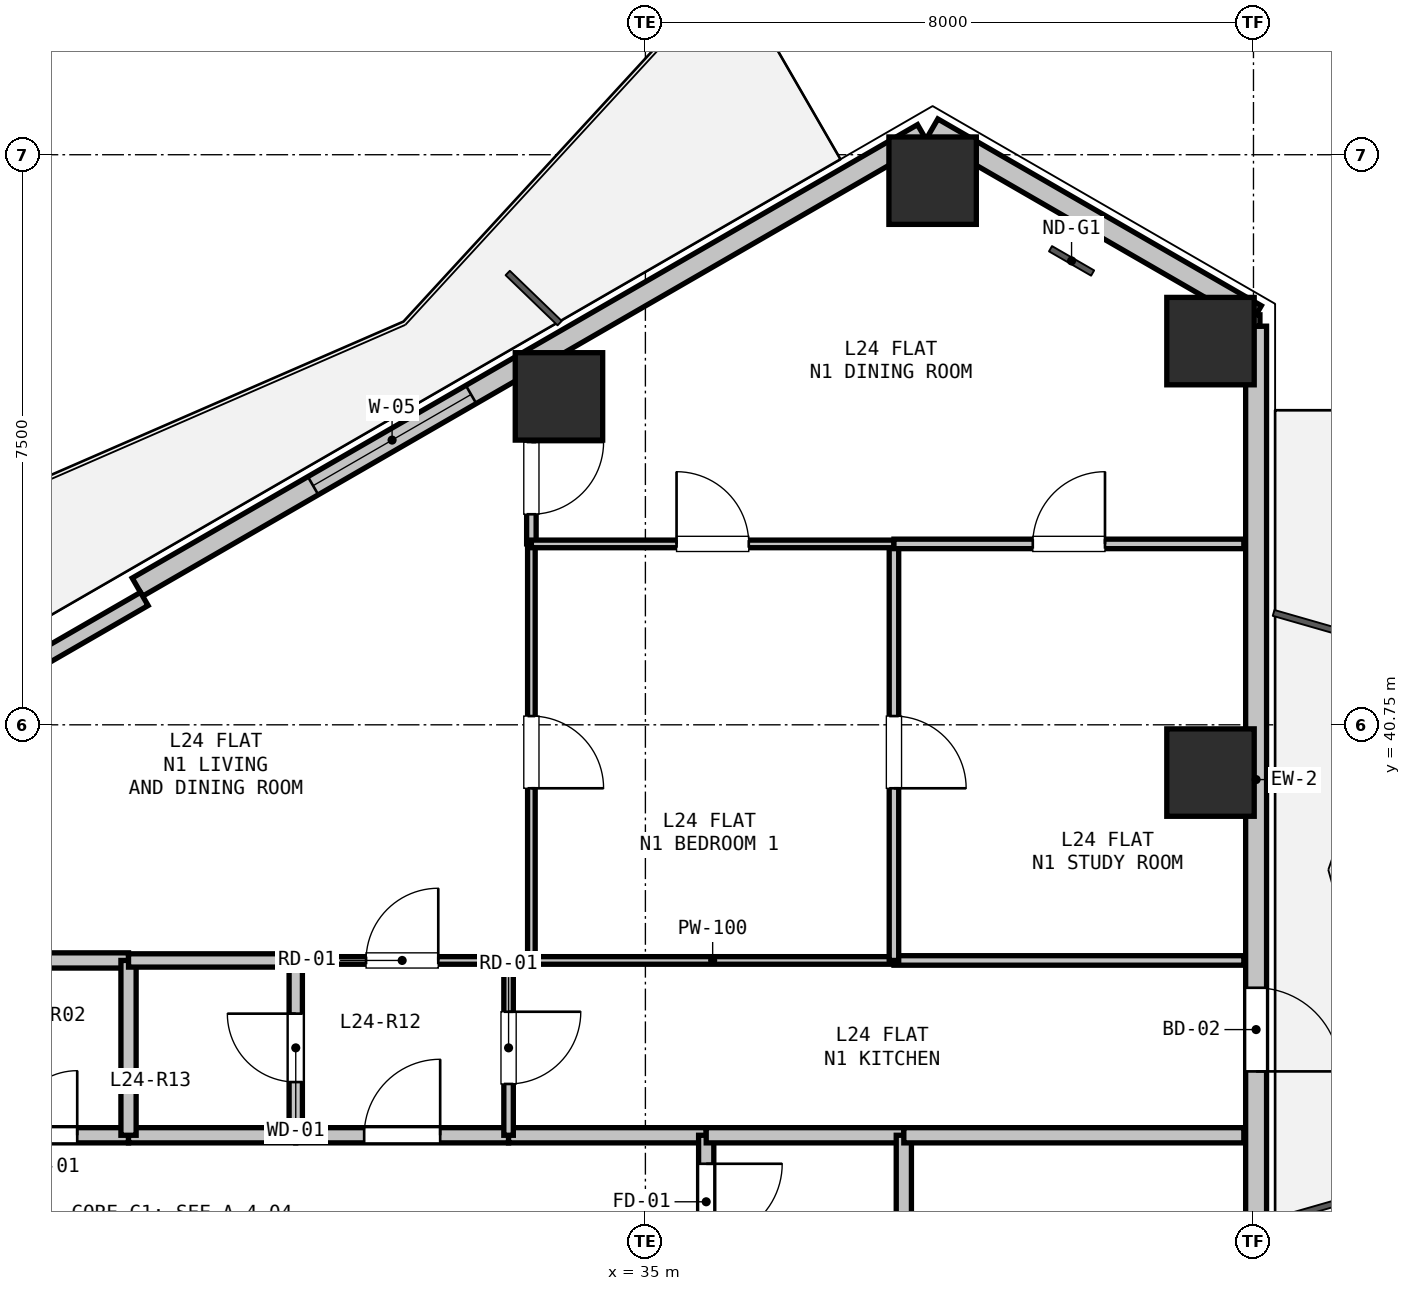
"""IFC4 building model, lengths in metres.
Left out: names, types, materials, properties, quantities, classifications, styles, units other than length and angle.
Written with IfcOpenShell. Run it as: python <this file> out.ifc"""

import sys

from ifc_helpers import new_model, si_unit, direction, frame, frame_2d, origin, origin_2d, place, context, subcontext, project, spatial, rectangle, hollow_rectangle, extrude, element, fill, save


model = new_model("IFC4")
c1 = context("Model", 3, precision=1e-05, world=origin(), true_north=direction((0.0, 1.0)))
c2 = subcontext(c1, "Body", "Model", "MODEL_VIEW")
j1 = project(units=[si_unit("LENGTHUNIT", "METRE"), si_unit("PLANEANGLEUNIT", "RADIAN")], contexts=[c1])
p1 = place(None, origin())
s1 = spatial("IfcSite", under=j1, at=p1, CompositionType="ELEMENT")
p2 = place(p1, origin())
s2 = spatial("IfcBuilding", under=s1, at=p2, CompositionType="ELEMENT")
p3 = place(p2, frame((0.0, 0.0, 90.0)))
s3 = spatial("IfcBuildingStorey", under=s2, at=p3, CompositionType="ELEMENT", Elevation=90.0)
for number, where, z_axis, x_axis in (
    (1, (33.863, 45.071, 0.0), (0.0, 0.0, 1.0), (1.0, 0.0, 0.0)),
    (2, (38.779, 47.909, 0.0), (0.0, 0.0, 1.0), (1.0, 0.0, 0.0)),
    (3, (42.435, 45.798, 0.0), (0.0, 0.0, 1.0), (1.0, 0.0, 0.0)),
    (4, (42.435, 40.122, 0.0), (0.0, 0.0, 1.0), (1.0, 0.0, 0.0)),
):
    element("IfcColumn", number, at=place(p3, frame(where, z_axis=z_axis, x_axis=x_axis)), inside=s3, PredefinedType="COLUMN", context=c2, shape_type="SweptSolid", body=[
        extrude(hollow_rectangle(XDim=1.15, YDim=1.15, WallThickness=0.032, at=origin_2d()), origin(), (0.0, 0.0, 1.0), 3.3),
    ])
p4 = place(p3, frame((38.779, 48.602, 0.0), z_axis=(0.0, 0.0, 1.0), x_axis=(0.866011848704, -0.500023477353, 0.0)))
e5 = element("IfcWall", 5, at=p4, inside=s3, PredefinedType="SOLIDWALL", context=c2, shape_type="SweptSolid", body=[
    extrude(rectangle(XDim=4.914, YDim=0.275, at=frame_2d((2.457, 0.0))), origin(), (0.0, 0.0, 1.0), 2.67),
])
p5 = place(p3, frame((28.317, 42.562, 0.0), z_axis=(0.0, 0.0, 1.0), x_axis=(0.866023023012, 0.500004123596, 0.0)))
e6 = element("IfcWall", 6, at=p5, inside=s3, PredefinedType="SOLIDWALL", context=c2, shape_type="SweptSolid", body=[
    extrude(rectangle(XDim=11.93, YDim=0.275, at=frame_2d((5.965, 0.0))), origin(), (0.0, 0.0, 1.0), 2.67),
])
p6 = place(p5, frame((2.668, 0.0, 0.9)))
e7 = element("IfcOpeningElement", 7, at=p6, cuts=e6, PredefinedType="OPENING", context=c2, shape_type="SweptSolid", body=[
    extrude(rectangle(XDim=2.4, YDim=1.6, at=frame_2d((1.2, 0.8))), frame((0.0, 0.147, 0.0), z_axis=(0.0, -1.0, 0.0), x_axis=(1.0, 0.0, 0.0)), (0.0, 0.0, 1.0), 0.295),
])
p7 = place(p3, frame((26.935, 41.556, 0.0), z_axis=(0.0, 0.0, 1.0), x_axis=(0.86605165483, 0.499954529098, 0.0)))
e8 = element("IfcWall", 8, at=p7, inside=s3, PredefinedType="PARAPET", context=c2, shape_type="SweptSolid", body=[
    extrude(rectangle(XDim=1.7, YDim=0.2, at=frame_2d((0.85, 0.0))), origin(), (0.0, 0.0, 1.0), 2.67),
])
p8 = place(p3, frame((43.035, 45.994, 0.0), z_axis=(0.0, 0.0, 1.0), x_axis=(0.0, -1.0, 0.0)))
e9 = element("IfcWall", 9, at=p8, inside=s3, PredefinedType="SOLIDWALL", context=c2, shape_type="SweptSolid", body=[
    extrude(rectangle(XDim=11.93, YDim=0.275, at=frame_2d((5.965, 0.0))), origin(), (0.0, 0.0, 1.0), 2.67),
])
p9 = place(p8, frame((8.704, 0.0, 0.0)))
e10 = element("IfcOpeningElement", 10, at=p9, cuts=e9, PredefinedType="OPENING", context=c2, shape_type="SweptSolid", body=[
    extrude(rectangle(XDim=1.1, YDim=2.1, at=frame_2d((0.55, 1.05))), frame((0.0, 0.147, 0.0), z_axis=(0.0, -1.0, 0.0), x_axis=(1.0, 0.0, 0.0)), (0.0, 0.0, 1.0), 0.295),
])
p10 = place(p3, frame((26.0, 35.35, 0.0), z_axis=(0.0, 0.0, 1.0), x_axis=(1.0, 0.0, 0.0)))
e11 = element("IfcWall", 11, at=p10, inside=s3, PredefinedType="PARTITIONING", context=c2, shape_type="SweptSolid", body=[
    extrude(rectangle(XDim=2.2, YDim=0.2, at=frame_2d((1.1, 0.0))), origin(), (0.0, 0.0, 1.0), 3.05),
])
p11 = place(p10, frame((0.675, 0.0, 0.0)))
e12 = element("IfcOpeningElement", 12, at=p11, cuts=e11, PredefinedType="OPENING", context=c2, shape_type="SweptSolid", body=[
    extrude(rectangle(XDim=0.85, YDim=2.1, at=frame_2d((0.425, 1.05))), frame((0.0, 0.11, 0.0), z_axis=(0.0, -1.0, 0.0), x_axis=(1.0, 0.0, 0.0)), (0.0, 0.0, 1.0), 0.22),
])
p12 = place(p3, frame((28.2, 35.35, 0.0), z_axis=(0.0, 0.0, 1.0), x_axis=(1.0, 0.0, 0.0)))
e13 = element("IfcWall", 13, at=p12, inside=s3, PredefinedType="PARTITIONING", context=c2, shape_type="SweptSolid", body=[
    extrude(rectangle(XDim=2.2, YDim=0.2, at=frame_2d((1.1, 0.0))), origin(), (0.0, 0.0, 1.0), 3.05),
])
p13 = place(p3, frame((30.4, 35.35, 0.0), z_axis=(0.0, 0.0, 1.0), x_axis=(1.0, 0.0, 0.0)))
e14 = element("IfcWall", 14, at=p13, inside=s3, PredefinedType="PARTITIONING", context=c2, shape_type="SweptSolid", body=[
    extrude(rectangle(XDim=2.8, YDim=0.2, at=frame_2d((1.4, 0.0))), origin(), (0.0, 0.0, 1.0), 3.05),
])
p14 = place(p13, frame((0.9, 0.0, 0.0)))
e15 = element("IfcOpeningElement", 15, at=p14, cuts=e14, PredefinedType="OPENING", context=c2, shape_type="SweptSolid", body=[
    extrude(rectangle(XDim=1.0, YDim=2.15, at=frame_2d((0.5, 1.075))), frame((0.0, 0.11, 0.0), z_axis=(0.0, -1.0, 0.0), x_axis=(1.0, 0.0, 0.0)), (0.0, 0.0, 1.0), 0.22),
])
p15 = place(p3, frame((33.2, 35.35, 0.0), z_axis=(0.0, 0.0, 1.0), x_axis=(1.0, 0.0, 0.0)))
e16 = element("IfcWall", 16, at=p15, inside=s3, PredefinedType="PARTITIONING", context=c2, shape_type="SweptSolid", body=[
    extrude(rectangle(XDim=2.6, YDim=0.2, at=frame_2d((1.3, 0.0))), origin(), (0.0, 0.0, 1.0), 3.05),
])
p16 = place(p3, frame((35.8, 35.35, 0.0), z_axis=(0.0, 0.0, 1.0), x_axis=(0.0, -1.0, 0.0)))
e17 = element("IfcWall", 17, at=p16, inside=s3, PredefinedType="PARTITIONING", context=c2, shape_type="SweptSolid", body=[
    extrude(rectangle(XDim=1.75, YDim=0.2, at=frame_2d((0.875, 0.0))), origin(), (0.0, 0.0, 1.0), 3.05),
])
p17 = place(p16, frame((0.375, 0.0, 0.0)))
e18 = element("IfcOpeningElement", 18, at=p17, cuts=e17, PredefinedType="OPENING", context=c2, shape_type="SweptSolid", body=[
    extrude(rectangle(XDim=1.0, YDim=2.15, at=frame_2d((0.5, 1.075))), frame((0.0, 0.11, 0.0), z_axis=(0.0, -1.0, 0.0), x_axis=(1.0, 0.0, 0.0)), (0.0, 0.0, 1.0), 0.22),
])
p18 = place(p3, frame((35.8, 35.35, 0.0), z_axis=(0.0, 0.0, 1.0), x_axis=(1.0, 0.0, 0.0)))
e19 = element("IfcWall", 19, at=p18, inside=s3, PredefinedType="PARTITIONING", context=c2, shape_type="SweptSolid", body=[
    extrude(rectangle(XDim=2.6, YDim=0.2, at=frame_2d((1.3, 0.0))), origin(), (0.0, 0.0, 1.0), 2.423),
])
p19 = place(p3, frame((38.4, 35.35, 0.0), z_axis=(0.0, 0.0, 1.0), x_axis=(0.0, -1.0, 0.0)))
e20 = element("IfcWall", 20, at=p19, inside=s3, PredefinedType="PARTITIONING", context=c2, shape_type="SweptSolid", body=[
    extrude(rectangle(XDim=6.85, YDim=0.2, at=frame_2d((3.425, 0.0))), origin(), (0.0, 0.0, 1.0), 3.05),
])
p20 = place(p19, frame((2.925, 0.0, 0.0)))
e21 = element("IfcOpeningElement", 21, at=p20, cuts=e20, PredefinedType="OPENING", context=c2, shape_type="SweptSolid", body=[
    extrude(rectangle(XDim=1.0, YDim=2.15, at=frame_2d((0.5, 1.075))), frame((0.0, 0.11, 0.0), z_axis=(0.0, -1.0, 0.0), x_axis=(1.0, 0.0, 0.0)), (0.0, 0.0, 1.0), 0.22),
])
p21 = place(p3, frame((30.4, 37.65, 0.0), z_axis=(0.0, 0.0, 1.0), x_axis=(1.0, 0.0, 0.0)))
e22 = element("IfcWall", 22, at=p21, inside=s3, PredefinedType="PARTITIONING", context=c2, shape_type="SweptSolid", body=[
    extrude(rectangle(XDim=2.8, YDim=0.1, at=frame_2d((1.4, 0.0))), origin(), (0.0, 0.0, 1.0), 3.05),
])
p22 = place(p21, frame((0.925, 0.0, 0.0)))
e23 = element("IfcOpeningElement", 23, at=p22, cuts=e22, PredefinedType="OPENING", context=c2, shape_type="SweptSolid", body=[
    extrude(rectangle(XDim=0.95, YDim=2.1, at=frame_2d((0.475, 1.05))), frame((0.0, 0.06, 0.0), z_axis=(0.0, -1.0, 0.0), x_axis=(1.0, 0.0, 0.0)), (0.0, 0.0, 1.0), 0.12),
])
p23 = place(p3, frame((33.2, 37.65, 0.0), z_axis=(0.0, 0.0, 1.0), x_axis=(0.0, -1.0, 0.0)))
e24 = element("IfcWall", 24, at=p23, inside=s3, PredefinedType="PARTITIONING", context=c2, shape_type="SweptSolid", body=[
    extrude(rectangle(XDim=2.3, YDim=0.125, at=frame_2d((1.15, 0.0))), origin(), (0.0, 0.0, 1.0), 3.05),
])
p24 = place(p23, frame((0.675, 0.0, 0.0)))
e25 = element("IfcOpeningElement", 25, at=p24, cuts=e24, PredefinedType="OPENING", context=c2, shape_type="SweptSolid", body=[
    extrude(rectangle(XDim=0.95, YDim=2.1, at=frame_2d((0.475, 1.05))), frame((0.0, 0.073, 0.0), z_axis=(0.0, -1.0, 0.0), x_axis=(1.0, 0.0, 0.0)), (0.0, 0.0, 1.0), 0.145),
])
p25 = place(p3, frame((30.4, 35.35, 0.0), z_axis=(0.0, 0.0, 1.0), x_axis=(0.0, 1.0, 0.0)))
e26 = element("IfcWall", 26, at=p25, inside=s3, PredefinedType="PLUMBINGWALL", context=c2, shape_type="SweptSolid", body=[
    extrude(rectangle(XDim=2.3, YDim=0.175, at=frame_2d((1.15, 0.0))), origin(), (0.0, 0.0, 1.0), 3.05),
])
p26 = place(p25, frame((0.7, 0.0, 0.0)))
e27 = element("IfcOpeningElement", 27, at=p26, cuts=e26, PredefinedType="OPENING", context=c2, shape_type="SweptSolid", body=[
    extrude(rectangle(XDim=0.9, YDim=2.1, at=frame_2d((0.45, 1.05))), frame((0.0, 0.097, 0.0), z_axis=(0.0, -1.0, 0.0), x_axis=(1.0, 0.0, 0.0)), (0.0, 0.0, 1.0), 0.195),
])
p27 = place(p3, frame((26.0, 37.65, 0.0), z_axis=(0.0, 0.0, 1.0), x_axis=(1.0, 0.0, 0.0)))
e28 = element("IfcWall", 28, at=p27, inside=s3, PredefinedType="PARTITIONING", context=c2, shape_type="SweptSolid", body=[
    extrude(rectangle(XDim=2.2, YDim=0.2, at=frame_2d((1.1, 0.0))), origin(), (0.0, 0.0, 1.0), 3.05),
])
p28 = place(p3, frame((28.2, 37.65, 0.0), z_axis=(0.0, 0.0, 1.0), x_axis=(0.0, -1.0, 0.0)))
e29 = element("IfcWall", 29, at=p28, inside=s3, PredefinedType="PARTITIONING", context=c2, shape_type="SweptSolid", body=[
    extrude(rectangle(XDim=2.3, YDim=0.2, at=frame_2d((1.15, 0.0))), origin(), (0.0, 0.0, 1.0), 3.05),
])
p29 = place(p3, frame((28.2, 37.65, 0.0), z_axis=(0.0, 0.0, 1.0), x_axis=(1.0, 0.0, 0.0)))
e30 = element("IfcWall", 30, at=p29, inside=s3, PredefinedType="PLUMBINGWALL", context=c2, shape_type="SweptSolid", body=[
    extrude(rectangle(XDim=2.2, YDim=0.175, at=frame_2d((1.1, 0.0))), origin(), (0.0, 0.0, 1.0), 3.05),
])
p30 = place(p3, frame((42.873, 35.35, 0.0), z_axis=(0.0, 0.0, 1.0), x_axis=(-1.0, 0.0, 0.0)))
e31 = element("IfcWall", 31, at=p30, inside=s3, PredefinedType="PARTITIONING", context=c2, shape_type="SweptSolid", body=[
    extrude(rectangle(XDim=4.473, YDim=0.2, at=frame_2d((2.237, 0.0))), origin(), (0.0, 0.0, 1.0), 2.365),
])
p31 = place(p3, frame((33.2, 37.65, 0.0), z_axis=(0.0, 0.0, 1.0), x_axis=(1.0, 0.0, 0.0)))
e32 = element("IfcWall", 32, at=p31, inside=s3, PredefinedType="PARTITIONING", context=c2, shape_type="SweptSolid", body=[
    extrude(rectangle(XDim=0.3, YDim=0.125, at=frame_2d((0.15, 0.0))), origin(), (0.0, 0.0, 1.0), 3.05),
])
p32 = place(p3, frame((33.5, 37.65, 0.0), z_axis=(0.0, 0.0, 1.0), x_axis=(1.0, 0.0, 0.0)))
e33 = element("IfcWall", 33, at=p32, inside=s3, PredefinedType="PARTITIONING", context=c2, shape_type="SweptSolid", body=[
    extrude(rectangle(XDim=4.77, YDim=0.1, at=frame_2d((2.385, 0.0))), origin(), (0.0, 0.0, 1.0), 2.423),
])
p33 = place(p3, frame((38.27, 37.65, 0.0), z_axis=(0.0, 0.0, 1.0), x_axis=(1.0, 0.0, 0.0)))
e34 = element("IfcWall", 34, at=p33, inside=s3, PredefinedType="PARTITIONING", context=c2, shape_type="SweptSolid", body=[
    extrude(rectangle(XDim=4.603, YDim=0.125, at=frame_2d((2.302, 0.0))), origin(), (0.0, 0.0, 1.0), 2.365),
])
p34 = place(p3, frame((33.5, 45.367, 0.0), z_axis=(0.0, 0.0, 1.0), x_axis=(0.0, -1.0, 0.0)))
e35 = element("IfcWall", 35, at=p34, inside=s3, PredefinedType="PARTITIONING", context=c2, shape_type="SweptSolid", body=[
    extrude(rectangle(XDim=2.237, YDim=0.125, at=frame_2d((1.119, 0.0))), origin(), (0.0, 0.0, 1.0), 2.66),
])
p35 = place(p34, frame((0.897, 0.0, 0.0)))
e36 = element("IfcOpeningElement", 36, at=p35, cuts=e35, PredefinedType="OPENING", context=c2, shape_type="SweptSolid", body=[
    extrude(rectangle(XDim=0.95, YDim=2.1, at=frame_2d((0.475, 1.05))), frame((0.0, 0.073, 0.0), z_axis=(0.0, -1.0, 0.0), x_axis=(1.0, 0.0, 0.0)), (0.0, 0.0, 1.0), 0.145),
])
p36 = place(p3, frame((33.5, 43.13, 0.0), z_axis=(0.0, 0.0, 1.0), x_axis=(0.0, -1.0, 0.0)))
e37 = element("IfcWall", 37, at=p36, inside=s3, PredefinedType="PARTITIONING", context=c2, shape_type="SweptSolid", body=[
    extrude(rectangle(XDim=5.48, YDim=0.1, at=frame_2d((2.74, 0.0))), origin(), (0.0, 0.0, 1.0), 3.05),
])
p37 = place(p36, frame((2.265, 0.0, 0.0)))
e38 = element("IfcOpeningElement", 38, at=p37, cuts=e37, PredefinedType="OPENING", context=c2, shape_type="SweptSolid", body=[
    extrude(rectangle(XDim=0.95, YDim=2.1, at=frame_2d((0.475, 1.05))), frame((0.0, 0.06, 0.0), z_axis=(0.0, -1.0, 0.0), x_axis=(1.0, 0.0, 0.0)), (0.0, 0.0, 1.0), 0.12),
])
p38 = place(p3, frame((38.27, 43.13, 0.0), z_axis=(0.0, 0.0, 1.0), x_axis=(0.0, -1.0, 0.0)))
e39 = element("IfcWall", 39, at=p38, inside=s3, PredefinedType="PARTITIONING", context=c2, shape_type="SweptSolid", body=[
    extrude(rectangle(XDim=5.48, YDim=0.125, at=frame_2d((2.74, 0.0))), origin(), (0.0, 0.0, 1.0), 3.05),
])
p39 = place(p38, frame((2.265, 0.0, 0.0)))
e40 = element("IfcOpeningElement", 40, at=p39, cuts=e39, PredefinedType="OPENING", context=c2, shape_type="SweptSolid", body=[
    extrude(rectangle(XDim=0.95, YDim=2.1, at=frame_2d((0.475, 1.05))), frame((0.0, 0.073, 0.0), z_axis=(0.0, -1.0, 0.0), x_axis=(1.0, 0.0, 0.0)), (0.0, 0.0, 1.0), 0.145),
])
p40 = place(p3, frame((33.5, 43.13, 0.0), z_axis=(0.0, 0.0, 1.0), x_axis=(1.0, 0.0, 0.0)))
e41 = element("IfcWall", 41, at=p40, inside=s3, PredefinedType="PARTITIONING", context=c2, shape_type="SweptSolid", body=[
    extrude(rectangle(XDim=4.77, YDim=0.1, at=frame_2d((2.385, 0.0))), origin(), (0.0, 0.0, 1.0), 2.423),
])
p41 = place(p40, frame((1.91, 0.0, 0.0)))
e42 = element("IfcOpeningElement", 42, at=p41, cuts=e41, PredefinedType="OPENING", context=c2, shape_type="SweptSolid", body=[
    extrude(rectangle(XDim=0.95, YDim=2.1, at=frame_2d((0.475, 1.05))), frame((0.0, 0.06, 0.0), z_axis=(0.0, -1.0, 0.0), x_axis=(1.0, 0.0, 0.0)), (0.0, 0.0, 1.0), 0.12),
])
p42 = place(p3, frame((38.27, 43.13, 0.0), z_axis=(0.0, 0.0, 1.0), x_axis=(1.0, 0.0, 0.0)))
e43 = element("IfcWall", 43, at=p42, inside=s3, PredefinedType="PARTITIONING", context=c2, shape_type="SweptSolid", body=[
    extrude(rectangle(XDim=4.603, YDim=0.125, at=frame_2d((2.302, 0.0))), origin(), (0.0, 0.0, 1.0), 2.66),
])
p43 = place(p42, frame((1.826, 0.0, 0.0)))
e44 = element("IfcOpeningElement", 44, at=p43, cuts=e43, PredefinedType="OPENING", context=c2, shape_type="SweptSolid", body=[
    extrude(rectangle(XDim=0.95, YDim=2.1, at=frame_2d((0.475, 1.05))), frame((0.0, 0.073, 0.0), z_axis=(0.0, -1.0, 0.0), x_axis=(1.0, 0.0, 0.0)), (0.0, 0.0, 1.0), 0.145),
])
p44 = place(p3, frame((43.035, 46.144, 0.0), z_axis=(0.0, 0.0, 1.0), x_axis=(0.0, -1.0, 0.0)))
e45 = element("IfcWall", 45, at=p44, inside=s3, PredefinedType="PARTITIONING", context=c2, shape_type="SweptSolid", body=[
    extrude(rectangle(XDim=0.15, YDim=0.1, at=frame_2d((0.075, 0.0))), origin(), (0.0, 0.0, 1.0), 3.05),
])
p45 = place(p6, origin())
e46 = element("IfcWindow", 46, at=p45, inside=s3, PartitioningType="SINGLE_PANEL", PredefinedType="WINDOW", context=c2, shape_type="SweptSolid", body=[
    extrude(rectangle(XDim=2.4, YDim=1.6, at=frame_2d((1.2, 0.8))), frame((0.0, 0.03, 0.0), z_axis=(0.0, -1.0, 0.0), x_axis=(1.0, 0.0, 0.0)), (0.0, 0.0, 1.0), 0.06),
])
fill(e7, e46)
p46 = place(p9, origin())
e47 = element("IfcDoor", 47, at=p46, inside=s3, OperationType="SINGLE_SWING_RIGHT", PredefinedType="DOOR", context=c2, shape_type="SweptSolid", body=[
    extrude(rectangle(XDim=1.1, YDim=2.1, at=frame_2d((0.55, 1.05))), frame((0.0, 0.025, 0.0), z_axis=(0.0, -1.0, 0.0), x_axis=(1.0, 0.0, 0.0)), (0.0, 0.0, 1.0), 0.05),
])
fill(e10, e47)
p47 = place(p17, origin())
e48 = element("IfcDoor", 48, at=p47, inside=s3, OperationType="SINGLE_SWING_LEFT", PredefinedType="DOOR", context=c2, shape_type="SweptSolid", body=[
    extrude(rectangle(XDim=1.0, YDim=2.15, at=frame_2d((0.5, 1.075))), frame((0.0, 0.025, 0.0), z_axis=(0.0, -1.0, 0.0), x_axis=(1.0, 0.0, 0.0)), (0.0, 0.0, 1.0), 0.05),
])
fill(e18, e48)
p48 = place(p14, origin())
e49 = element("IfcDoor", 49, at=p48, inside=s3, OperationType="SINGLE_SWING_RIGHT", PredefinedType="DOOR", context=c2, shape_type="SweptSolid", body=[
    extrude(rectangle(XDim=1.0, YDim=2.15, at=frame_2d((0.5, 1.075))), frame((0.0, 0.025, 0.0), z_axis=(0.0, -1.0, 0.0), x_axis=(1.0, 0.0, 0.0)), (0.0, 0.0, 1.0), 0.05),
])
fill(e15, e49)
p49 = place(p11, origin())
e50 = element("IfcDoor", 50, at=p49, inside=s3, OperationType="SINGLE_SWING_RIGHT", PredefinedType="DOOR", context=c2, shape_type="SweptSolid", body=[
    extrude(rectangle(XDim=0.85, YDim=2.1, at=frame_2d((0.425, 1.05))), frame((0.0, 0.025, 0.0), z_axis=(0.0, -1.0, 0.0), x_axis=(1.0, 0.0, 0.0)), (0.0, 0.0, 1.0), 0.05),
])
fill(e12, e50)
p50 = place(p26, origin())
e51 = element("IfcDoor", 51, at=p50, inside=s3, OperationType="SINGLE_SWING_RIGHT", PredefinedType="DOOR", context=c2, shape_type="SweptSolid", body=[
    extrude(rectangle(XDim=0.9, YDim=2.1, at=frame_2d((0.45, 1.05))), frame((0.0, 0.025, 0.0), z_axis=(0.0, -1.0, 0.0), x_axis=(1.0, 0.0, 0.0)), (0.0, 0.0, 1.0), 0.05),
])
fill(e27, e51)
p51 = place(p24, origin())
e52 = element("IfcDoor", 52, at=p51, inside=s3, OperationType="SINGLE_SWING_LEFT", PredefinedType="DOOR", context=c2, shape_type="SweptSolid", body=[
    extrude(rectangle(XDim=0.95, YDim=2.1, at=frame_2d((0.475, 1.05))), frame((0.0, 0.025, 0.0), z_axis=(0.0, -1.0, 0.0), x_axis=(1.0, 0.0, 0.0)), (0.0, 0.0, 1.0), 0.05),
])
fill(e25, e52)
p52 = place(p22, origin())
e53 = element("IfcDoor", 53, at=p52, inside=s3, OperationType="SINGLE_SWING_RIGHT", PredefinedType="DOOR", context=c2, shape_type="SweptSolid", body=[
    extrude(rectangle(XDim=0.95, YDim=2.1, at=frame_2d((0.475, 1.05))), frame((0.0, 0.025, 0.0), z_axis=(0.0, -1.0, 0.0), x_axis=(1.0, 0.0, 0.0)), (0.0, 0.0, 1.0), 0.05),
])
fill(e23, e53)
p53 = place(p37, origin())
e54 = element("IfcDoor", 54, at=p53, inside=s3, OperationType="SINGLE_SWING_RIGHT", PredefinedType="DOOR", context=c2, shape_type="SweptSolid", body=[
    extrude(rectangle(XDim=0.95, YDim=2.1, at=frame_2d((0.475, 1.05))), frame((0.0, 0.025, 0.0), z_axis=(0.0, -1.0, 0.0), x_axis=(1.0, 0.0, 0.0)), (0.0, 0.0, 1.0), 0.05),
])
fill(e38, e54)
p54 = place(p35, origin())
e55 = element("IfcDoor", 55, at=p54, inside=s3, OperationType="SINGLE_SWING_LEFT", PredefinedType="DOOR", context=c2, shape_type="SweptSolid", body=[
    extrude(rectangle(XDim=0.95, YDim=2.1, at=frame_2d((0.475, 1.05))), frame((0.0, 0.025, 0.0), z_axis=(0.0, -1.0, 0.0), x_axis=(1.0, 0.0, 0.0)), (0.0, 0.0, 1.0), 0.05),
])
fill(e36, e55)
p55 = place(p39, origin())
e56 = element("IfcDoor", 56, at=p55, inside=s3, OperationType="SINGLE_SWING_RIGHT", PredefinedType="DOOR", context=c2, shape_type="SweptSolid", body=[
    extrude(rectangle(XDim=0.95, YDim=2.1, at=frame_2d((0.475, 1.05))), frame((0.0, 0.025, 0.0), z_axis=(0.0, -1.0, 0.0), x_axis=(1.0, 0.0, 0.0)), (0.0, 0.0, 1.0), 0.05),
])
fill(e40, e56)
p56 = place(p41, origin())
e57 = element("IfcDoor", 57, at=p56, inside=s3, OperationType="SINGLE_SWING_LEFT", PredefinedType="DOOR", context=c2, shape_type="SweptSolid", body=[
    extrude(rectangle(XDim=0.95, YDim=2.1, at=frame_2d((0.475, 1.05))), frame((0.0, 0.025, 0.0), z_axis=(0.0, -1.0, 0.0), x_axis=(1.0, 0.0, 0.0)), (0.0, 0.0, 1.0), 0.05),
])
fill(e42, e57)
p57 = place(p43, origin())
e58 = element("IfcDoor", 58, at=p57, inside=s3, OperationType="SINGLE_SWING_RIGHT", PredefinedType="DOOR", context=c2, shape_type="SweptSolid", body=[
    extrude(rectangle(XDim=0.95, YDim=2.1, at=frame_2d((0.475, 1.05))), frame((0.0, 0.025, 0.0), z_axis=(0.0, -1.0, 0.0), x_axis=(1.0, 0.0, 0.0)), (0.0, 0.0, 1.0), 0.05),
])
fill(e44, e58)
save(model, sys.argv[1])
